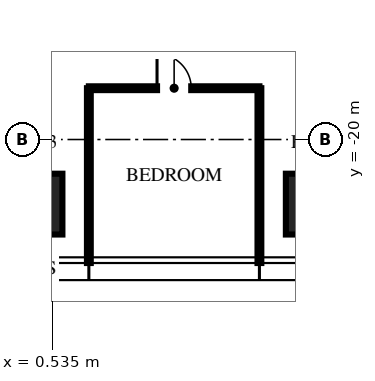
"""IFC4 building model, lengths in metres.
Left out: names, types, materials, properties, quantities, classifications, styles, units other than length and angle.
Written with IfcOpenShell. Run it as: python <this file> out.ifc"""

import sys

from ifc_helpers import new_model, si_unit, direction, frame, frame_2d, origin, origin_2d, place, context, subcontext, project, spatial, rectangle, extrude, element, fill, save


model = new_model("IFC4")
c1 = context("Model", 3, precision=1e-05, world=origin(), true_north=direction((0.0, 1.0)))
c2 = subcontext(c1, "Body", "Model", "MODEL_VIEW")
j1 = project(units=[si_unit("LENGTHUNIT", "METRE"), si_unit("PLANEANGLEUNIT", "RADIAN")], contexts=[c1])
p1 = place(None, origin())
s1 = spatial("IfcSite", under=j1, at=p1, CompositionType="ELEMENT")
p2 = place(p1, origin())
s2 = spatial("IfcBuilding", under=s1, at=p2, CompositionType="ELEMENT")
p3 = place(p2, frame((0.0, 0.0, 327.0)))
s3 = spatial("IfcBuildingStorey", under=s2, at=p3, CompositionType="ELEMENT", Elevation=327.0)
for number, where, z_axis, x_axis in (
    (1, (7.48, -21.7, 0.0), (0.0, 0.0, 1.0), (1.0, 0.0, 0.0)),
    (2, (0.0, -21.7, 0.0), (0.0, 0.0, 1.0), (1.0, 0.0, 0.0)),
):
    element("IfcColumn", number, at=place(p3, frame(where, z_axis=z_axis, x_axis=x_axis)), inside=s3, PredefinedType="COLUMN", context=c2, shape_type="SweptSolid", body=[
        extrude(rectangle(XDim=1.6, YDim=1.6, at=origin_2d()), origin(), (0.0, 0.0, 1.0), 3.75),
    ])
for number, where, z_axis, x_axis in (
    (3, (1.496, -18.65, 0.0), (0.0, 0.0, 1.0), (0.0, -1.0, 0.0)),
    (4, (5.984, -18.65, 0.0), (0.0, 0.0, 1.0), (0.0, -1.0, 0.0)),
):
    element("IfcWall", number, at=place(p3, frame(where, z_axis=z_axis, x_axis=x_axis)), inside=s3, PredefinedType="PARTITIONING", context=c2, shape_type="SweptSolid", body=[
        extrude(rectangle(XDim=4.6, YDim=0.1, at=frame_2d((2.3, 0.0))), origin(), (0.0, 0.0, 1.0), 3.01),
    ])
p4 = place(p3, frame((1.496, -18.65, 0.0), z_axis=(0.0, 0.0, 1.0), x_axis=(1.0, 0.0, 0.0)))
e5 = element("IfcWall", 5, at=p4, inside=s3, PredefinedType="PARTITIONING", context=c2, shape_type="SweptSolid", body=[
    extrude(rectangle(XDim=4.488, YDim=0.1, at=frame_2d((2.244, 0.0))), origin(), (0.0, 0.0, 1.0), 2.91),
])
p5 = place(p4, frame((1.794, 0.0, 0.0)))
e6 = element("IfcOpeningElement", 6, at=p5, cuts=e5, PredefinedType="OPENING", context=c2, shape_type="SweptSolid", body=[
    extrude(rectangle(XDim=0.9, YDim=2.1, at=frame_2d((0.45, 1.05))), frame((0.0, 0.06, 0.0), z_axis=(0.0, -1.0, 0.0), x_axis=(1.0, 0.0, 0.0)), (0.0, 0.0, 1.0), 0.12),
])
p6 = place(p5, origin())
e7 = element("IfcDoor", 7, at=p6, inside=s3, OperationType="SINGLE_SWING_LEFT", PredefinedType="DOOR", context=c2, shape_type="SweptSolid", body=[
    extrude(rectangle(XDim=0.9, YDim=2.1, at=frame_2d((0.45, 1.05))), frame((0.0, 0.025, 0.0), z_axis=(0.0, -1.0, 0.0), x_axis=(1.0, 0.0, 0.0)), (0.0, 0.0, 1.0), 0.05),
])
fill(e6, e7)
save(model, sys.argv[1])
